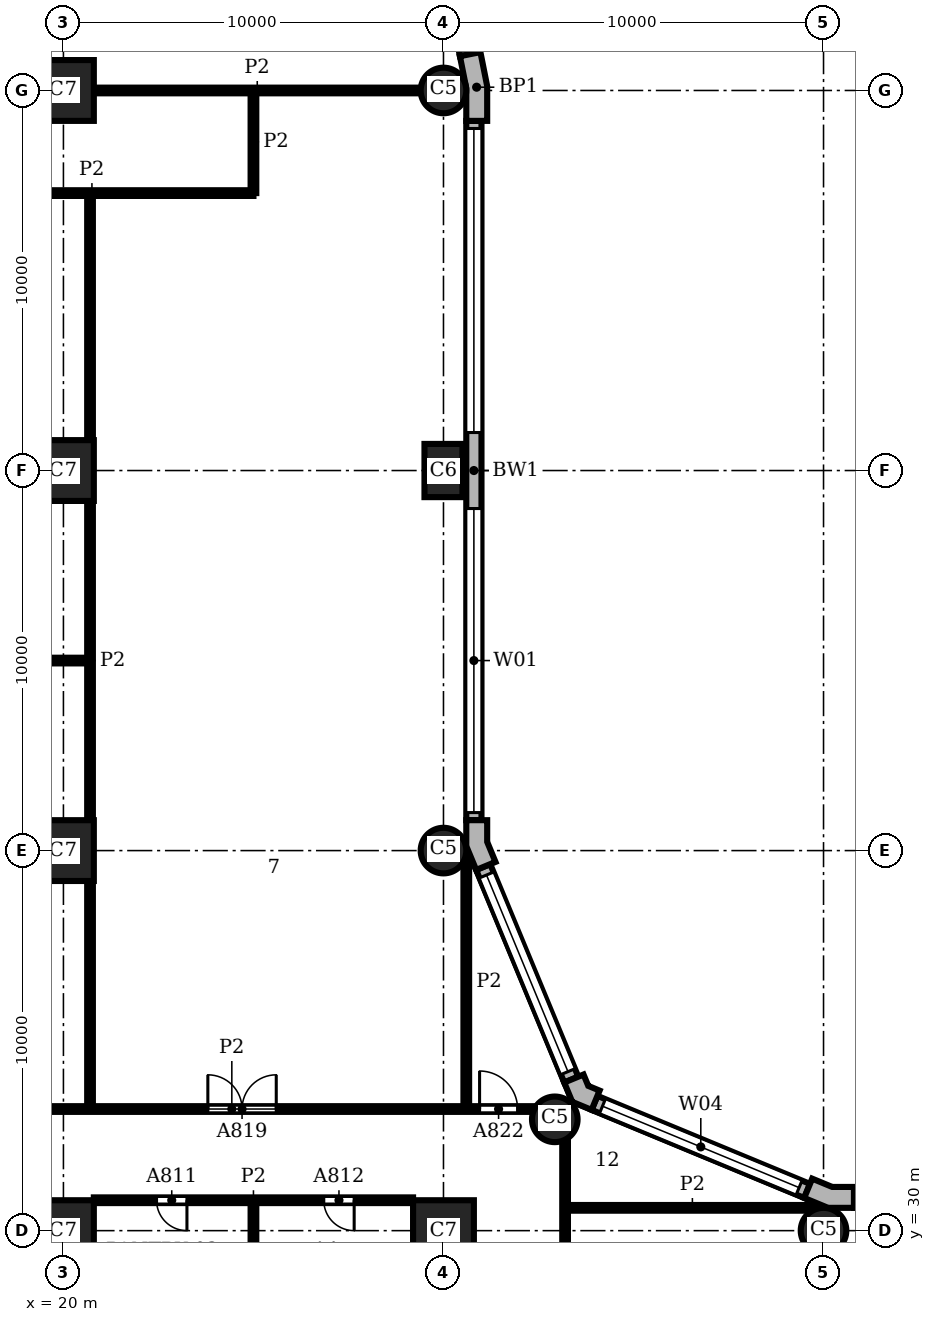
"""IFC4 building model, lengths in metres.
Left out: names, types, materials, properties, quantities, classifications, styles, units other than length and angle.
Written with IfcOpenShell. Run it as: python <this file> out.ifc"""

import sys

from ifc_helpers import new_model, si_unit, direction, frame, frame_2d, origin, origin_2d, place, context, subcontext, project, spatial, polyline, rectangle, circle, outline, extrude, element, fill, save


model = new_model("IFC4")
c1 = context("Model", 3, precision=1e-05, world=origin(), true_north=direction((0.0, 1.0)))
c2 = subcontext(c1, "Body", "Model", "MODEL_VIEW")
j1 = project(units=[si_unit("LENGTHUNIT", "METRE"), si_unit("PLANEANGLEUNIT", "RADIAN")], contexts=[c1])
p1 = place(None, origin())
s1 = spatial("IfcSite", under=j1, at=p1, CompositionType="ELEMENT")
p2 = place(p1, origin())
s2 = spatial("IfcBuilding", under=s1, at=p2, CompositionType="ELEMENT")
p3 = place(p2, frame((0.0, 0.0, 93.9)))
s3 = spatial("IfcBuildingStorey", under=s2, at=p3, CompositionType="ELEMENT", Elevation=93.9)
for number, where, z_axis, x_axis in (
    (1, (40.0, 30.0, 0.0), (0.0, 0.0, 1.0), (1.0, 0.0, 0.0)),
    (2, (32.929, 32.929, 0.0), (0.0, 0.0, 1.0), (1.0, 0.0, 0.0)),
    (3, (30.0, 40.0, 0.0), (0.0, 0.0, 1.0), (1.0, 0.0, 0.0)),
):
    element("IfcColumn", number, at=place(p3, frame(where, z_axis=z_axis, x_axis=x_axis)), inside=s3, PredefinedType="COLUMN", context=c2, shape_type="SweptSolid", body=[
        extrude(circle(Radius=0.6, at=origin_2d()), origin(), (0.0, 0.0, 1.0), 3.9),
    ])
p4 = place(p3, frame((30.0, 50.0, 0.0), z_axis=(0.0, 0.0, 1.0), x_axis=(0.0, 1.0, 0.0)))
e4 = element("IfcColumn", 4, at=p4, inside=s3, PredefinedType="COLUMN", context=c2, shape_type="SweptSolid", body=[
    extrude(rectangle(XDim=1.4, YDim=1.0, at=origin_2d()), origin(), (0.0, 0.0, 1.0), 3.9),
])
p5 = place(p3, frame((30.0, 60.0, 0.0), z_axis=(0.0, 0.0, 1.0), x_axis=(1.0, 0.0, 0.0)))
e5 = element("IfcColumn", 5, at=p5, inside=s3, PredefinedType="COLUMN", context=c2, shape_type="SweptSolid", body=[
    extrude(circle(Radius=0.6, at=origin_2d()), origin(), (0.0, 0.0, 1.0), 3.9),
])
for number, where, z_axis, x_axis in (
    (6, (20.0, 30.0, 0.0), (0.0, 0.0, 1.0), (1.0, 0.0, 0.0)),
    (7, (20.0, 40.0, 0.0), (0.0, 0.0, 1.0), (1.0, 0.0, 0.0)),
    (8, (20.0, 50.0, 0.0), (0.0, 0.0, 1.0), (1.0, 0.0, 0.0)),
    (9, (20.0, 60.0, 0.0), (0.0, 0.0, 1.0), (1.0, 0.0, 0.0)),
    (10, (30.0, 30.0, 0.0), (0.0, 0.0, 1.0), (1.0, 0.0, 0.0)),
):
    element("IfcColumn", number, at=place(p3, frame(where, z_axis=z_axis, x_axis=x_axis)), inside=s3, PredefinedType="COLUMN", context=c2, shape_type="SweptSolid", body=[
        extrude(rectangle(XDim=1.6, YDim=1.6, at=origin_2d()), origin(), (0.0, 0.0, 1.0), 3.9),
    ])
p6 = place(p3, origin())
e11 = element("IfcWall", 11, at=p6, inside=s3, PredefinedType="SOLIDWALL", context=c2, shape_type="SweptSolid", body=[
    extrude(outline(polyline([(40.8, 31.0), (40.8, 31.15), (40.229, 31.15), (39.701, 31.369), (39.644, 31.23), (39.49, 30.861), (40.119, 30.6), (40.8, 30.6), (40.8, 31.0)])), origin(), (0.0, 0.0, 1.0), 3.9),
])
e12 = element("IfcWall", 12, at=p6, inside=s3, PredefinedType="SOLIDWALL", context=c2, shape_type="SweptSolid", body=[
    extrude(outline(polyline([(34.051, 33.547), (34.108, 33.685), (33.809, 33.809), (33.685, 34.108), (33.547, 34.051), (33.177, 33.898), (33.388, 33.388), (33.898, 33.177), (34.051, 33.547)])), origin(), (0.0, 0.0, 1.0), 3.9),
])
e13 = element("IfcWall", 13, at=p6, inside=s3, PredefinedType="SOLIDWALL", context=c2, shape_type="SweptSolid", body=[
    extrude(outline(polyline([(31.23, 39.644), (31.369, 39.701), (31.15, 40.229), (31.15, 40.8), (31.0, 40.8), (30.6, 40.8), (30.6, 40.119), (30.861, 39.49), (31.23, 39.644)])), origin(), (0.0, 0.0, 1.0), 3.9),
])
e14 = element("IfcWall", 14, at=p6, inside=s3, PredefinedType="SOLIDWALL", context=c2, shape_type="SweptSolid", body=[
    extrude(outline(polyline([(31.0, 59.2), (31.15, 59.2), (31.15, 60.113), (30.972, 61.009), (30.825, 60.98), (30.432, 60.902), (30.6, 60.059), (30.6, 59.2), (31.0, 59.2)])), origin(), (0.0, 0.0, 1.0), 3.9),
])
p7 = place(p3, frame((69.2, 30.8, 0.0), z_axis=(0.0, 0.0, 1.0), x_axis=(-1.0, 0.0, 0.0)))
e15 = element("IfcWall", 15, at=p7, inside=s3, PredefinedType="SOLIDWALL", context=c2, shape_type="SweptSolid", body=[
    extrude(rectangle(XDim=28.4, YDim=0.4, at=frame_2d((14.2, 0.0))), origin(), (0.0, 0.0, 1.0), 3.9),
])
p8 = place(p7, frame((0.2, 0.0, 0.9)))
e16 = element("IfcOpeningElement", 16, at=p8, cuts=e15, PredefinedType="OPENING", context=c2, shape_type="SweptSolid", body=[
    extrude(rectangle(XDim=8.0, YDim=2.35, at=frame_2d((4.0, 1.175))), frame((0.0, 0.21, 0.0), z_axis=(0.0, -1.0, 0.0), x_axis=(1.0, 0.0, 0.0)), (0.0, 0.0, 1.0), 0.42),
])
p9 = place(p7, frame((10.2, 0.0, 0.9)))
e17 = element("IfcOpeningElement", 17, at=p9, cuts=e15, PredefinedType="OPENING", context=c2, shape_type="SweptSolid", body=[
    extrude(rectangle(XDim=8.0, YDim=2.35, at=frame_2d((4.0, 1.175))), frame((0.0, 0.21, 0.0), z_axis=(0.0, -1.0, 0.0), x_axis=(1.0, 0.0, 0.0)), (0.0, 0.0, 1.0), 0.42),
])
p10 = place(p7, frame((20.2, 0.0, 0.9)))
e18 = element("IfcOpeningElement", 18, at=p10, cuts=e15, PredefinedType="OPENING", context=c2, shape_type="SweptSolid", body=[
    extrude(rectangle(XDim=8.0, YDim=2.35, at=frame_2d((4.0, 1.175))), frame((0.0, 0.21, 0.0), z_axis=(0.0, -1.0, 0.0), x_axis=(1.0, 0.0, 0.0)), (0.0, 0.0, 1.0), 0.42),
])
p11 = place(p3, frame((39.567, 31.045, 0.0), z_axis=(0.0, 0.0, 1.0), x_axis=(-0.923891000409, 0.382655745237, 0.0)))
e19 = element("IfcWall", 19, at=p11, inside=s3, PredefinedType="SOLIDWALL", context=c2, shape_type="SweptSolid", body=[
    extrude(rectangle(XDim=6.053, YDim=0.4, at=frame_2d((3.027, 0.0))), origin(), (0.0, 0.0, 1.0), 3.9),
])
p12 = place(p11, frame((0.227, 0.0, 0.9)))
e20 = element("IfcOpeningElement", 20, at=p12, cuts=e19, PredefinedType="OPENING", context=c2, shape_type="SweptSolid", body=[
    extrude(rectangle(XDim=5.6, YDim=2.35, at=frame_2d((2.8, 1.175))), frame((0.0, 0.21, 0.0), z_axis=(0.0, -1.0, 0.0), x_axis=(1.0, 0.0, 0.0)), (0.0, 0.0, 1.0), 0.42),
])
p13 = place(p3, frame((33.362, 33.974, 0.0), z_axis=(0.0, 0.0, 1.0), x_axis=(-0.382655745237, 0.923891000409, 0.0)))
e21 = element("IfcWall", 21, at=p13, inside=s3, PredefinedType="SOLIDWALL", context=c2, shape_type="SweptSolid", body=[
    extrude(rectangle(XDim=6.053, YDim=0.4, at=frame_2d((3.027, 0.0))), origin(), (0.0, 0.0, 1.0), 3.9),
])
p14 = place(p13, frame((0.227, 0.0, 0.9)))
e22 = element("IfcOpeningElement", 22, at=p14, cuts=e21, PredefinedType="OPENING", context=c2, shape_type="SweptSolid", body=[
    extrude(rectangle(XDim=5.6, YDim=2.35, at=frame_2d((2.8, 1.175))), frame((0.0, 0.21, 0.0), z_axis=(0.0, -1.0, 0.0), x_axis=(1.0, 0.0, 0.0)), (0.0, 0.0, 1.0), 0.42),
])
p15 = place(p3, frame((30.8, 40.8, 0.0), z_axis=(0.0, 0.0, 1.0), x_axis=(0.0, 1.0, 0.0)))
e23 = element("IfcWall", 23, at=p15, inside=s3, PredefinedType="SOLIDWALL", context=c2, shape_type="SweptSolid", body=[
    extrude(rectangle(XDim=18.4, YDim=0.4, at=frame_2d((9.2, 0.0))), origin(), (0.0, 0.0, 1.0), 3.9),
])
p16 = place(p15, frame((0.2, 0.0, 0.9)))
e24 = element("IfcOpeningElement", 24, at=p16, cuts=e23, PredefinedType="OPENING", context=c2, shape_type="SweptSolid", body=[
    extrude(rectangle(XDim=8.0, YDim=2.35, at=frame_2d((4.0, 1.175))), frame((0.0, 0.21, 0.0), z_axis=(0.0, -1.0, 0.0), x_axis=(1.0, 0.0, 0.0)), (0.0, 0.0, 1.0), 0.42),
])
p17 = place(p15, frame((10.2, 0.0, 0.9)))
e25 = element("IfcOpeningElement", 25, at=p17, cuts=e23, PredefinedType="OPENING", context=c2, shape_type="SweptSolid", body=[
    extrude(rectangle(XDim=8.0, YDim=2.35, at=frame_2d((4.0, 1.175))), frame((0.0, 0.21, 0.0), z_axis=(0.0, -1.0, 0.0), x_axis=(1.0, 0.0, 0.0)), (0.0, 0.0, 1.0), 0.42),
])
p18 = place(p3, frame((30.629, 60.941, 0.0), z_axis=(0.0, 0.0, 1.0), x_axis=(-0.195098533057, 0.98078364709, 0.0)))
e26 = element("IfcWall", 26, at=p18, inside=s3, PredefinedType="SOLIDWALL", context=c2, shape_type="SweptSolid", body=[
    extrude(rectangle(XDim=4.753, YDim=0.4, at=frame_2d((2.376, 0.0))), origin(), (0.0, 0.0, 1.0), 3.9),
])
p19 = place(p18, frame((0.226, 0.0, 0.9)))
e27 = element("IfcOpeningElement", 27, at=p19, cuts=e26, PredefinedType="OPENING", context=c2, shape_type="SweptSolid", body=[
    extrude(rectangle(XDim=4.3, YDim=2.35, at=frame_2d((2.15, 1.175))), frame((0.0, 0.21, 0.0), z_axis=(0.0, -1.0, 0.0), x_axis=(1.0, 0.0, 0.0)), (0.0, 0.0, 1.0), 0.42),
])
p20 = place(p3, frame((20.7, 33.2, 0.0), z_axis=(0.0, 0.0, 1.0), x_axis=(0.0, 1.0, 0.0)))
e28 = element("IfcWall", 28, at=p20, inside=s3, PredefinedType="PARTITIONING", context=c2, shape_type="SweptSolid", body=[
    extrude(rectangle(XDim=6.0, YDim=0.15, at=frame_2d((3.0, 0.0))), origin(), (0.0, 0.0, 1.0), 3.58),
])
p21 = place(p3, frame((20.7, 40.8, 0.0), z_axis=(0.0, 0.0, 1.0), x_axis=(0.0, 1.0, 0.0)))
e29 = element("IfcWall", 29, at=p21, inside=s3, PredefinedType="PARTITIONING", context=c2, shape_type="SweptSolid", body=[
    extrude(rectangle(XDim=8.4, YDim=0.15, at=frame_2d((4.2, 0.0))), origin(), (0.0, 0.0, 1.0), 3.58),
])
p22 = place(p3, frame((20.7, 50.8, 0.0), z_axis=(0.0, 0.0, 1.0), x_axis=(0.0, 1.0, 0.0)))
e30 = element("IfcWall", 30, at=p22, inside=s3, PredefinedType="PARTITIONING", context=c2, shape_type="SweptSolid", body=[
    extrude(rectangle(XDim=6.5, YDim=0.15, at=frame_2d((3.25, 0.0))), origin(), (0.0, 0.0, 1.0), 3.58),
])
p23 = place(p3, frame((25.0, 28.0, 0.0), z_axis=(0.0, 0.0, 1.0), x_axis=(0.0, 1.0, 0.0)))
e31 = element("IfcWall", 31, at=p23, inside=s3, PredefinedType="PARTITIONING", context=c2, shape_type="SweptSolid", body=[
    extrude(rectangle(XDim=2.8, YDim=0.15, at=frame_2d((1.4, 0.0))), origin(), (0.0, 0.0, 1.0), 3.58),
])
p24 = place(p3, frame((25.0, 57.3, 0.0), z_axis=(0.0, 0.0, 1.0), x_axis=(0.0, 1.0, 0.0)))
e32 = element("IfcWall", 32, at=p24, inside=s3, PredefinedType="PARTITIONING", context=c2, shape_type="SweptSolid", body=[
    extrude(rectangle(XDim=2.7, YDim=0.15, at=frame_2d((1.35, 0.0))), origin(), (0.0, 0.0, 1.0), 3.58),
])
p25 = place(p3, frame((30.6, 33.2, 0.0), z_axis=(0.0, 0.0, 1.0), x_axis=(0.0, 1.0, 0.0)))
e33 = element("IfcWall", 33, at=p25, inside=s3, PredefinedType="PARTITIONING", context=c2, shape_type="SweptSolid", body=[
    extrude(rectangle(XDim=6.699, YDim=0.15, at=frame_2d((3.35, 0.0))), origin(), (0.0, 0.0, 1.0), 3.58),
])
p26 = place(p3, frame((33.2, 15.45, 0.0), z_axis=(0.0, 0.0, 1.0), x_axis=(0.0, 1.0, 0.0)))
e34 = element("IfcWall", 34, at=p26, inside=s3, PredefinedType="PARTITIONING", context=c2, shape_type="SweptSolid", body=[
    extrude(rectangle(XDim=16.912, YDim=0.15, at=frame_2d((8.456, 0.0))), origin(), (0.0, 0.0, 1.0), 3.58),
])
p27 = place(p3, frame((33.2, 30.6, 0.0), z_axis=(0.0, 0.0, 1.0), x_axis=(1.0, 0.0, 0.0)))
e35 = element("IfcWall", 35, at=p27, inside=s3, PredefinedType="PARTITIONING", context=c2, shape_type="SweptSolid", body=[
    extrude(rectangle(XDim=6.699, YDim=0.15, at=frame_2d((3.35, 0.0))), origin(), (0.0, 0.0, 1.0), 3.58),
])
p28 = place(p3, frame((20.8, 30.8, 0.0), z_axis=(0.0, 0.0, 1.0), x_axis=(1.0, 0.0, 0.0)))
e36 = element("IfcWall", 36, at=p28, inside=s3, PredefinedType="PARTITIONING", context=c2, shape_type="SweptSolid", body=[
    extrude(rectangle(XDim=8.4, YDim=0.15, at=frame_2d((4.2, 0.0))), origin(), (0.0, 0.0, 1.0), 3.58),
])
p29 = place(p28, frame((1.65, 0.0, 0.0)))
e37 = element("IfcOpeningElement", 37, at=p29, cuts=e36, PredefinedType="OPENING", context=c2, shape_type="SweptSolid", body=[
    extrude(rectangle(XDim=0.8, YDim=2.1, at=frame_2d((0.4, 1.05))), frame((0.0, 0.085, 0.0), z_axis=(0.0, -1.0, 0.0), x_axis=(1.0, 0.0, 0.0)), (0.0, 0.0, 1.0), 0.17),
])
p30 = place(p28, frame((6.05, 0.0, 0.0)))
e38 = element("IfcOpeningElement", 38, at=p30, cuts=e36, PredefinedType="OPENING", context=c2, shape_type="SweptSolid", body=[
    extrude(rectangle(XDim=0.8, YDim=2.1, at=frame_2d((0.4, 1.05))), frame((0.0, 0.085, 0.0), z_axis=(0.0, -1.0, 0.0), x_axis=(1.0, 0.0, 0.0)), (0.0, 0.0, 1.0), 0.17),
])
p31 = place(p3, frame((16.5, 33.2, 0.0), z_axis=(0.0, 0.0, 1.0), x_axis=(1.0, 0.0, 0.0)))
e39 = element("IfcWall", 39, at=p31, inside=s3, PredefinedType="PARTITIONING", context=c2, shape_type="SweptSolid", body=[
    extrude(rectangle(XDim=15.862, YDim=0.15, at=frame_2d((7.931, 0.0))), origin(), (0.0, 0.0, 1.0), 3.58),
])
p32 = place(p31, frame((7.3, 0.0, 0.0)))
e40 = element("IfcOpeningElement", 40, at=p32, cuts=e39, PredefinedType="OPENING", context=c2, shape_type="SweptSolid", body=[
    extrude(rectangle(XDim=1.8, YDim=2.1, at=frame_2d((0.9, 1.05))), frame((0.0, 0.085, 0.0), z_axis=(0.0, -1.0, 0.0), x_axis=(1.0, 0.0, 0.0)), (0.0, 0.0, 1.0), 0.17),
])
p33 = place(p31, frame((14.45, 0.0, 0.0)))
e41 = element("IfcOpeningElement", 41, at=p33, cuts=e39, PredefinedType="OPENING", context=c2, shape_type="SweptSolid", body=[
    extrude(rectangle(XDim=1.0, YDim=2.1, at=frame_2d((0.5, 1.05))), frame((0.0, 0.085, 0.0), z_axis=(0.0, -1.0, 0.0), x_axis=(1.0, 0.0, 0.0)), (0.0, 0.0, 1.0), 0.17),
])
p34 = place(p3, frame((16.5, 45.0, 0.0), z_axis=(0.0, 0.0, 1.0), x_axis=(1.0, 0.0, 0.0)))
e42 = element("IfcWall", 42, at=p34, inside=s3, PredefinedType="PARTITIONING", context=c2, shape_type="SweptSolid", body=[
    extrude(rectangle(XDim=4.2, YDim=0.15, at=frame_2d((2.1, 0.0))), origin(), (0.0, 0.0, 1.0), 3.58),
])
p35 = place(p3, frame((16.5, 57.3, 0.0), z_axis=(0.0, 0.0, 1.0), x_axis=(1.0, 0.0, 0.0)))
e43 = element("IfcWall", 43, at=p35, inside=s3, PredefinedType="PARTITIONING", context=c2, shape_type="SweptSolid", body=[
    extrude(rectangle(XDim=8.5, YDim=0.15, at=frame_2d((4.25, 0.0))), origin(), (0.0, 0.0, 1.0), 3.58),
])
p36 = place(p3, frame((20.8, 60.0, 0.0), z_axis=(0.0, 0.0, 1.0), x_axis=(1.0, 0.0, 0.0)))
e44 = element("IfcWall", 44, at=p36, inside=s3, PredefinedType="PARTITIONING", context=c2, shape_type="SweptSolid", body=[
    extrude(rectangle(XDim=8.6, YDim=0.15, at=frame_2d((4.3, 0.0))), origin(), (0.0, 0.0, 1.0), 3.58),
])
p37 = place(p12, origin())
e45 = element("IfcWindow", 45, at=p37, inside=s3, PartitioningType="SINGLE_PANEL", PredefinedType="WINDOW", context=c2, shape_type="SweptSolid", body=[
    extrude(rectangle(XDim=5.6, YDim=2.35, at=frame_2d((2.8, 1.175))), frame((0.0, 0.16, 0.0), z_axis=(0.0, -1.0, 0.0), x_axis=(1.0, 0.0, 0.0)), (0.0, 0.0, 1.0), 0.06),
])
fill(e20, e45)
p38 = place(p14, origin())
e46 = element("IfcWindow", 46, at=p38, inside=s3, PartitioningType="SINGLE_PANEL", PredefinedType="WINDOW", context=c2, shape_type="SweptSolid", body=[
    extrude(rectangle(XDim=5.6, YDim=2.35, at=frame_2d((2.8, 1.175))), frame((0.0, 0.16, 0.0), z_axis=(0.0, -1.0, 0.0), x_axis=(1.0, 0.0, 0.0)), (0.0, 0.0, 1.0), 0.06),
])
fill(e22, e46)
p39 = place(p16, origin())
e47 = element("IfcWindow", 47, at=p39, inside=s3, PartitioningType="SINGLE_PANEL", PredefinedType="WINDOW", context=c2, shape_type="SweptSolid", body=[
    extrude(rectangle(XDim=8.0, YDim=2.35, at=frame_2d((4.0, 1.175))), frame((0.0, 0.16, 0.0), z_axis=(0.0, -1.0, 0.0), x_axis=(1.0, 0.0, 0.0)), (0.0, 0.0, 1.0), 0.06),
])
fill(e24, e47)
p40 = place(p17, origin())
e48 = element("IfcWindow", 48, at=p40, inside=s3, PartitioningType="SINGLE_PANEL", PredefinedType="WINDOW", context=c2, shape_type="SweptSolid", body=[
    extrude(rectangle(XDim=8.0, YDim=2.35, at=frame_2d((4.0, 1.175))), frame((0.0, 0.16, 0.0), z_axis=(0.0, -1.0, 0.0), x_axis=(1.0, 0.0, 0.0)), (0.0, 0.0, 1.0), 0.06),
])
fill(e25, e48)
p41 = place(p29, frame((0.8, 0.0, 0.0), z_axis=(0.0, 0.0, 1.0), x_axis=(-1.0, 0.0, 0.0)))
e49 = element("IfcDoor", 49, at=p41, inside=s3, OperationType="SINGLE_SWING_LEFT", PredefinedType="DOOR", context=c2, shape_type="SweptSolid", body=[
    extrude(rectangle(XDim=0.8, YDim=2.1, at=frame_2d((0.4, 1.05))), frame((0.0, 0.025, 0.0), z_axis=(0.0, -1.0, 0.0), x_axis=(1.0, 0.0, 0.0)), (0.0, 0.0, 1.0), 0.05),
])
fill(e37, e49)
p42 = place(p30, frame((0.8, 0.0, 0.0), z_axis=(0.0, 0.0, 1.0), x_axis=(-1.0, 0.0, 0.0)))
e50 = element("IfcDoor", 50, at=p42, inside=s3, OperationType="SINGLE_SWING_LEFT", PredefinedType="DOOR", context=c2, shape_type="SweptSolid", body=[
    extrude(rectangle(XDim=0.8, YDim=2.1, at=frame_2d((0.4, 1.05))), frame((0.0, 0.025, 0.0), z_axis=(0.0, -1.0, 0.0), x_axis=(1.0, 0.0, 0.0)), (0.0, 0.0, 1.0), 0.05),
])
fill(e38, e50)
p43 = place(p32, origin())
e51 = element("IfcDoor", 51, at=p43, inside=s3, OperationType="DOUBLE_DOOR_SINGLE_SWING", PredefinedType="DOOR", context=c2, shape_type="SweptSolid", body=[
    extrude(rectangle(XDim=1.8, YDim=2.1, at=frame_2d((0.9, 1.05))), frame((0.0, 0.025, 0.0), z_axis=(0.0, -1.0, 0.0), x_axis=(1.0, 0.0, 0.0)), (0.0, 0.0, 1.0), 0.05),
])
fill(e40, e51)
p44 = place(p33, origin())
e52 = element("IfcDoor", 52, at=p44, inside=s3, OperationType="SINGLE_SWING_LEFT", PredefinedType="DOOR", context=c2, shape_type="SweptSolid", body=[
    extrude(rectangle(XDim=1.0, YDim=2.1, at=frame_2d((0.5, 1.05))), frame((0.0, 0.025, 0.0), z_axis=(0.0, -1.0, 0.0), x_axis=(1.0, 0.0, 0.0)), (0.0, 0.0, 1.0), 0.05),
])
fill(e41, e52)
save(model, sys.argv[1])
